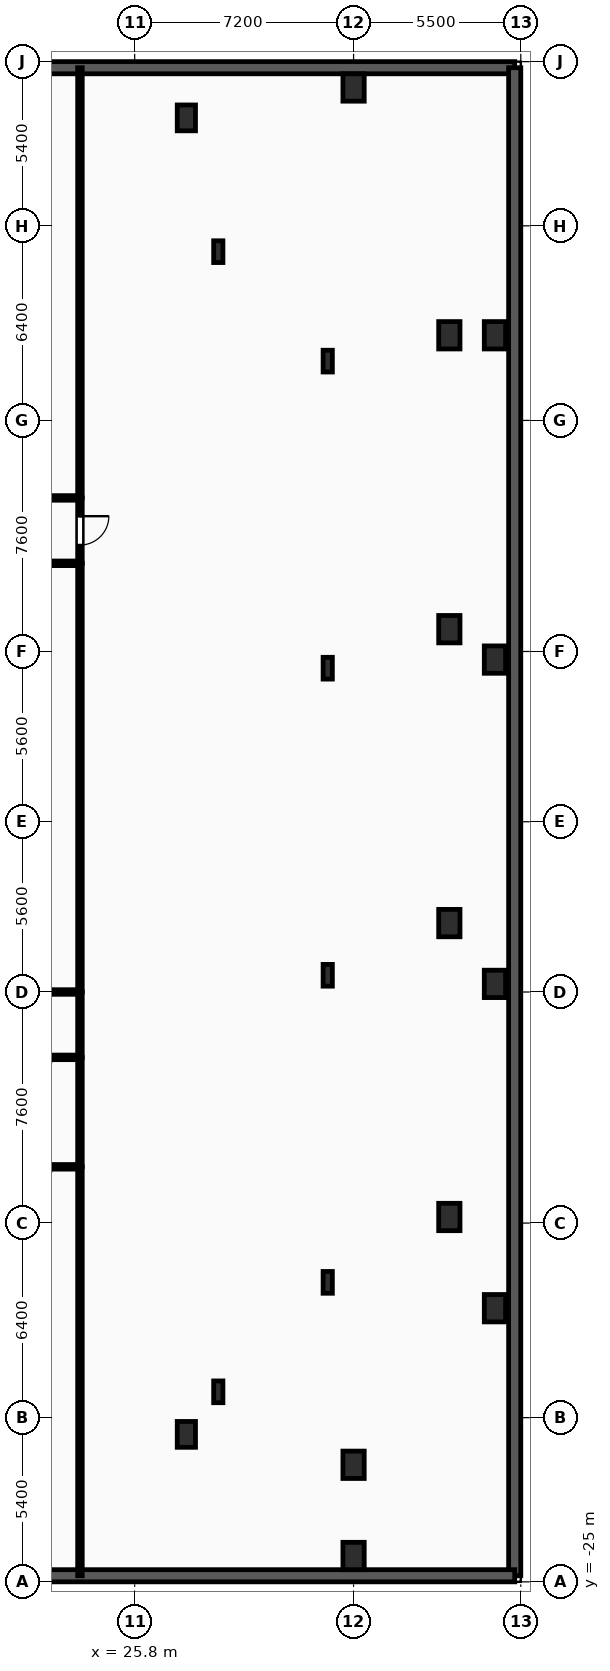
"""IFC4 building model, lengths in metres.
Left out: names, types, materials, properties, quantities, classifications, styles, units other than length and angle.
Written with IfcOpenShell. Run it as: python <this file> out.ifc"""

import sys

from ifc_helpers import new_model, si_unit, direction, frame, frame_2d, origin, origin_2d, place, context, subcontext, project, spatial, rectangle, i_section, extrude, element, fill, save


model = new_model("IFC4")
c1 = context("Model", 3, precision=1e-05, world=origin(), true_north=direction((0.0, 1.0)))
c2 = subcontext(c1, "Body", "Model", "MODEL_VIEW")
j1 = project(units=[si_unit("LENGTHUNIT", "METRE"), si_unit("PLANEANGLEUNIT", "RADIAN")], contexts=[c1])
p1 = place(None, origin())
s1 = spatial("IfcSite", under=j1, at=p1, CompositionType="ELEMENT")
p2 = place(p1, origin())
s2 = spatial("IfcBuilding", under=s1, at=p2, CompositionType="ELEMENT")
p3 = place(p2, frame((0.0, 0.0, -4.5)))
s3 = spatial("IfcBuildingStorey", under=s2, at=p3, CompositionType="ELEMENT", Elevation=-4.5)
for number, where, z_axis, x_axis in (
    (1, (33.0, -21.15, 0.0), (0.0, 0.0, 1.0), (1.0, 0.0, 0.0)),
    (2, (33.0, 24.15, 0.0), (0.0, 0.0, 1.0), (1.0, 0.0, 0.0)),
    (3, (36.15, -13.0, 0.0), (0.0, 0.0, 1.0), (1.0, 0.0, 0.0)),
    (4, (36.15, -3.333, 0.0), (0.0, 0.0, 1.0), (1.0, 0.0, 0.0)),
    (5, (36.15, 6.333, 0.0), (0.0, 0.0, 1.0), (1.0, 0.0, 0.0)),
    (6, (36.15, 16.0, 0.0), (0.0, 0.0, 1.0), (1.0, 0.0, 0.0)),
    (7, (33.0, -24.15, 0.0), (0.0, 0.0, 1.0), (1.0, 0.0, 0.0)),
    (8, (37.65, -16.0, 0.0), (0.0, 0.0, 1.0), (1.0, 0.0, 0.0)),
    (9, (37.65, -5.333, 0.0), (0.0, 0.0, 1.0), (1.0, 0.0, 0.0)),
    (10, (37.65, 5.333, 0.0), (0.0, 0.0, 1.0), (1.0, 0.0, 0.0)),
    (11, (37.65, 16.0, 0.0), (0.0, 0.0, 1.0), (1.0, 0.0, 0.0)),
):
    element("IfcColumn", number, at=place(p3, frame(where, z_axis=z_axis, x_axis=x_axis)), inside=s3, PredefinedType="COLUMN", context=c2, shape_type="SweptSolid", body=[
        extrude(rectangle(XDim=0.7, YDim=0.9, at=origin_2d()), origin(), (0.0, 0.0, 1.0), 4.5),
    ])
for number, where, z_axis, x_axis in (
    (12, (27.5, -20.15, 0.0), (0.0, 0.0, 1.0), (1.0, 0.0, 0.0)),
    (13, (27.5, 23.15, 0.0), (0.0, 0.0, 1.0), (1.0, 0.0, 0.0)),
):
    element("IfcColumn", number, at=place(p3, frame(where, z_axis=z_axis, x_axis=x_axis)), inside=s3, PredefinedType="PILASTER", context=c2, shape_type="SweptSolid", body=[
        extrude(rectangle(XDim=0.6, YDim=0.85, at=origin_2d()), origin(), (0.0, 0.0, 1.0), 4.5),
    ])
for number, where, z_axis, x_axis in (
    (14, (28.55, -18.75, 0.0), (0.0, 0.0, 1.0), (1.0, 0.0, 0.0)),
    (15, (28.55, 18.75, 0.0), (0.0, 0.0, 1.0), (1.0, 0.0, 0.0)),
    (16, (32.15, -15.15, 0.0), (0.0, 0.0, 1.0), (1.0, 0.0, 0.0)),
    (17, (32.15, -5.05, 0.0), (0.0, 0.0, 1.0), (1.0, 0.0, 0.0)),
    (18, (32.15, 5.05, 0.0), (0.0, 0.0, 1.0), (1.0, 0.0, 0.0)),
    (19, (32.15, 15.15, 0.0), (0.0, 0.0, 1.0), (1.0, 0.0, 0.0)),
):
    element("IfcColumn", number, at=place(p3, frame(where, z_axis=z_axis, x_axis=x_axis)), inside=s3, PredefinedType="COLUMN", context=c2, shape_type="SweptSolid", body=[
        extrude(i_section(OverallWidth=0.304, OverallDepth=0.716, WebThickness=0.021, FlangeThickness=0.04, FilletRadius=0.027, at=origin_2d()), origin(), (0.0, 0.0, 1.0), 4.5),
    ])
p4 = place(p3, frame((-38.3, 24.8, 0.0), z_axis=(0.0, 0.0, 1.0), x_axis=(1.0, 0.0, 0.0)))
e20 = element("IfcWall", 20, at=p4, inside=s3, PredefinedType="SOLIDWALL", context=c2, shape_type="SweptSolid", body=[
    extrude(rectangle(XDim=76.6, YDim=0.4, at=frame_2d((38.3, 0.0))), origin(), (0.0, 0.0, 1.0), 4.16),
])
p5 = place(p3, frame((38.3, 24.8, 0.0), z_axis=(0.0, 0.0, 1.0), x_axis=(0.0, -1.0, 0.0)))
e21 = element("IfcWall", 21, at=p5, inside=s3, PredefinedType="SOLIDWALL", context=c2, shape_type="SweptSolid", body=[
    extrude(rectangle(XDim=49.6, YDim=0.4, at=frame_2d((24.8, 0.0))), origin(), (0.0, 0.0, 1.0), 4.16),
])
p6 = place(p3, frame((38.3, -24.8, 0.0), z_axis=(0.0, 0.0, 1.0), x_axis=(-1.0, 0.0, 0.0)))
e22 = element("IfcWall", 22, at=p6, inside=s3, PredefinedType="SOLIDWALL", context=c2, shape_type="SweptSolid", body=[
    extrude(rectangle(XDim=76.6, YDim=0.4, at=frame_2d((38.3, 0.0))), origin(), (0.0, 0.0, 1.0), 4.16),
])
p7 = place(p3, frame((0.0, 10.65, 0.0), z_axis=(0.0, 0.0, 1.0), x_axis=(1.0, 0.0, 0.0)))
e23 = element("IfcWall", 23, at=p7, inside=s3, PredefinedType="PARTITIONING", context=c2, shape_type="SweptSolid", body=[
    extrude(rectangle(XDim=24.0, YDim=0.15, at=frame_2d((12.0, 0.0))), origin(), (0.0, 0.0, 1.0), 4.16),
])
p8 = place(p7, frame((3.316, 0.0, 0.0)))
e24 = element("IfcOpeningElement", 24, at=p8, cuts=e23, PredefinedType="OPENING", context=c2, shape_type="SweptSolid", body=[
    extrude(rectangle(XDim=0.95, YDim=2.1, at=frame_2d((0.475, 1.05))), frame((0.0, 0.085, 0.0), z_axis=(0.0, -1.0, 0.0), x_axis=(1.0, 0.0, 0.0)), (0.0, 0.0, 1.0), 0.17),
])
p9 = place(p3, frame((24.0, 8.5, 0.0), z_axis=(0.0, 0.0, 1.0), x_axis=(-1.0, 0.0, 0.0)))
e25 = element("IfcWall", 25, at=p9, inside=s3, PredefinedType="PARTITIONING", context=c2, shape_type="SweptSolid", body=[
    extrude(rectangle(XDim=5.2, YDim=0.15, at=frame_2d((2.6, 0.0))), origin(), (0.0, 0.0, 1.0), 4.16),
])
p10 = place(p9, frame((0.966, 0.0, 0.0)))
e26 = element("IfcOpeningElement", 26, at=p10, cuts=e25, PredefinedType="OPENING", context=c2, shape_type="SweptSolid", body=[
    extrude(rectangle(XDim=0.95, YDim=2.1, at=frame_2d((0.475, 1.05))), frame((0.0, 0.085, 0.0), z_axis=(0.0, -1.0, 0.0), x_axis=(1.0, 0.0, 0.0)), (0.0, 0.0, 1.0), 0.17),
])
p11 = place(p3, frame((24.0, 10.65, 0.0), z_axis=(0.0, 0.0, 1.0), x_axis=(0.0, -1.0, 0.0)))
e27 = element("IfcWall", 27, at=p11, inside=s3, PredefinedType="PARTITIONING", context=c2, shape_type="SweptSolid", body=[
    extrude(rectangle(XDim=2.15, YDim=0.15, at=frame_2d((1.075, 0.0))), origin(), (0.0, 0.0, 1.0), 4.16),
])
p12 = place(p11, frame((0.6, 0.0, 0.0)))
e28 = element("IfcOpeningElement", 28, at=p12, cuts=e27, PredefinedType="OPENING", context=c2, shape_type="SweptSolid", body=[
    extrude(rectangle(XDim=0.95, YDim=2.1, at=frame_2d((0.475, 1.05))), frame((0.0, 0.085, 0.0), z_axis=(0.0, -1.0, 0.0), x_axis=(1.0, 0.0, 0.0)), (0.0, 0.0, 1.0), 0.17),
])
p13 = place(p3, frame((18.8, -5.6, 0.0), z_axis=(0.0, 0.0, 1.0), x_axis=(1.0, 0.0, 0.0)))
e29 = element("IfcWall", 29, at=p13, inside=s3, PredefinedType="PARTITIONING", context=c2, shape_type="SweptSolid", body=[
    extrude(rectangle(XDim=5.2, YDim=0.15, at=frame_2d((2.6, 0.0))), origin(), (0.0, 0.0, 1.0), 4.16),
])
p14 = place(p3, frame((24.0, -5.6, 0.0), z_axis=(0.0, 0.0, 1.0), x_axis=(0.0, -1.0, 0.0)))
e30 = element("IfcWall", 30, at=p14, inside=s3, PredefinedType="PARTITIONING", context=c2, shape_type="SweptSolid", body=[
    extrude(rectangle(XDim=2.15, YDim=0.15, at=frame_2d((1.075, 0.0))), origin(), (0.0, 0.0, 1.0), 4.16),
])
p15 = place(p3, frame((24.0, -7.75, 0.0), z_axis=(0.0, 0.0, 1.0), x_axis=(-1.0, 0.0, 0.0)))
e31 = element("IfcWall", 31, at=p15, inside=s3, PredefinedType="PARTITIONING", context=c2, shape_type="SweptSolid", body=[
    extrude(rectangle(XDim=4.8, YDim=0.15, at=frame_2d((2.4, 0.0))), origin(), (0.0, 0.0, 1.0), 4.16),
])
p16 = place(p15, frame((0.916, 0.0, 0.0)))
e32 = element("IfcOpeningElement", 32, at=p16, cuts=e31, PredefinedType="OPENING", context=c2, shape_type="SweptSolid", body=[
    extrude(rectangle(XDim=0.95, YDim=2.1, at=frame_2d((0.475, 1.05))), frame((0.0, 0.085, 0.0), z_axis=(0.0, -1.0, 0.0), x_axis=(1.0, 0.0, 0.0)), (0.0, 0.0, 1.0), 0.17),
])
p17 = place(p3, frame((24.0, 24.8, 0.0), z_axis=(0.0, 0.0, 1.0), x_axis=(0.0, -1.0, 0.0)))
e33 = element("IfcWall", 33, at=p17, inside=s3, PredefinedType="PARTITIONING", context=c2, shape_type="SweptSolid", body=[
    extrude(rectangle(XDim=14.15, YDim=0.15, at=frame_2d((7.075, 0.0))), origin(), (0.0, 0.0, 1.0), 4.16),
])
p18 = place(p3, frame((24.0, 8.5, 0.0), z_axis=(0.0, 0.0, 1.0), x_axis=(0.0, -1.0, 0.0)))
e34 = element("IfcWall", 34, at=p18, inside=s3, PredefinedType="PARTITIONING", context=c2, shape_type="SweptSolid", body=[
    extrude(rectangle(XDim=14.1, YDim=0.15, at=frame_2d((7.05, 0.0))), origin(), (0.0, 0.0, 1.0), 4.16),
])
p19 = place(p3, frame((24.0, -11.35, 0.0), z_axis=(0.0, 0.0, 1.0), x_axis=(0.0, 1.0, 0.0)))
e35 = element("IfcWall", 35, at=p19, inside=s3, PredefinedType="PARTITIONING", context=c2, shape_type="SweptSolid", body=[
    extrude(rectangle(XDim=3.6, YDim=0.15, at=frame_2d((1.8, 0.0))), origin(), (0.0, 0.0, 1.0), 4.16),
])
p20 = place(p3, frame((24.0, -24.8, 0.0), z_axis=(0.0, 0.0, 1.0), x_axis=(0.0, 1.0, 0.0)))
e36 = element("IfcWall", 36, at=p20, inside=s3, PredefinedType="PARTITIONING", context=c2, shape_type="SweptSolid", body=[
    extrude(rectangle(XDim=13.45, YDim=0.15, at=frame_2d((6.725, 0.0))), origin(), (0.0, 0.0, 1.0), 4.16),
])
p21 = place(p3, frame((24.0, -11.35, 0.0), z_axis=(0.0, 0.0, 1.0), x_axis=(-1.0, 0.0, 0.0)))
e37 = element("IfcWall", 37, at=p21, inside=s3, PredefinedType="PARTITIONING", context=c2, shape_type="SweptSolid", body=[
    extrude(rectangle(XDim=4.8, YDim=0.15, at=frame_2d((2.4, 0.0))), origin(), (0.0, 0.0, 1.0), 4.16),
])
p22 = place(p21, frame((0.916, 0.0, 0.0)))
e38 = element("IfcOpeningElement", 38, at=p22, cuts=e37, PredefinedType="OPENING", context=c2, shape_type="SweptSolid", body=[
    extrude(rectangle(XDim=0.95, YDim=2.1, at=frame_2d((0.475, 1.05))), frame((0.0, 0.085, 0.0), z_axis=(0.0, -1.0, 0.0), x_axis=(1.0, 0.0, 0.0)), (0.0, 0.0, 1.0), 0.17),
])
p23 = place(p12, origin())
e39 = element("IfcDoor", 39, at=p23, inside=s3, OperationType="SINGLE_SWING_LEFT", PredefinedType="DOOR", context=c2, shape_type="SweptSolid", body=[
    extrude(rectangle(XDim=0.95, YDim=2.1, at=frame_2d((0.475, 1.05))), frame((0.0, 0.025, 0.0), z_axis=(0.0, -1.0, 0.0), x_axis=(1.0, 0.0, 0.0)), (0.0, 0.0, 1.0), 0.05),
])
fill(e28, e39)
p24 = place(p16, origin())
e40 = element("IfcDoor", 40, at=p24, inside=s3, OperationType="SINGLE_SWING_RIGHT", PredefinedType="DOOR", context=c2, shape_type="SweptSolid", body=[
    extrude(rectangle(XDim=0.95, YDim=2.1, at=frame_2d((0.475, 1.05))), frame((0.0, 0.025, 0.0), z_axis=(0.0, -1.0, 0.0), x_axis=(1.0, 0.0, 0.0)), (0.0, 0.0, 1.0), 0.05),
])
fill(e32, e40)
p25 = place(p22, origin())
e41 = element("IfcDoor", 41, at=p25, inside=s3, OperationType="SINGLE_SWING_RIGHT", PredefinedType="DOOR", context=c2, shape_type="SweptSolid", body=[
    extrude(rectangle(XDim=0.95, YDim=2.1, at=frame_2d((0.475, 1.05))), frame((0.0, 0.025, 0.0), z_axis=(0.0, -1.0, 0.0), x_axis=(1.0, 0.0, 0.0)), (0.0, 0.0, 1.0), 0.05),
])
fill(e38, e41)
save(model, sys.argv[1])
